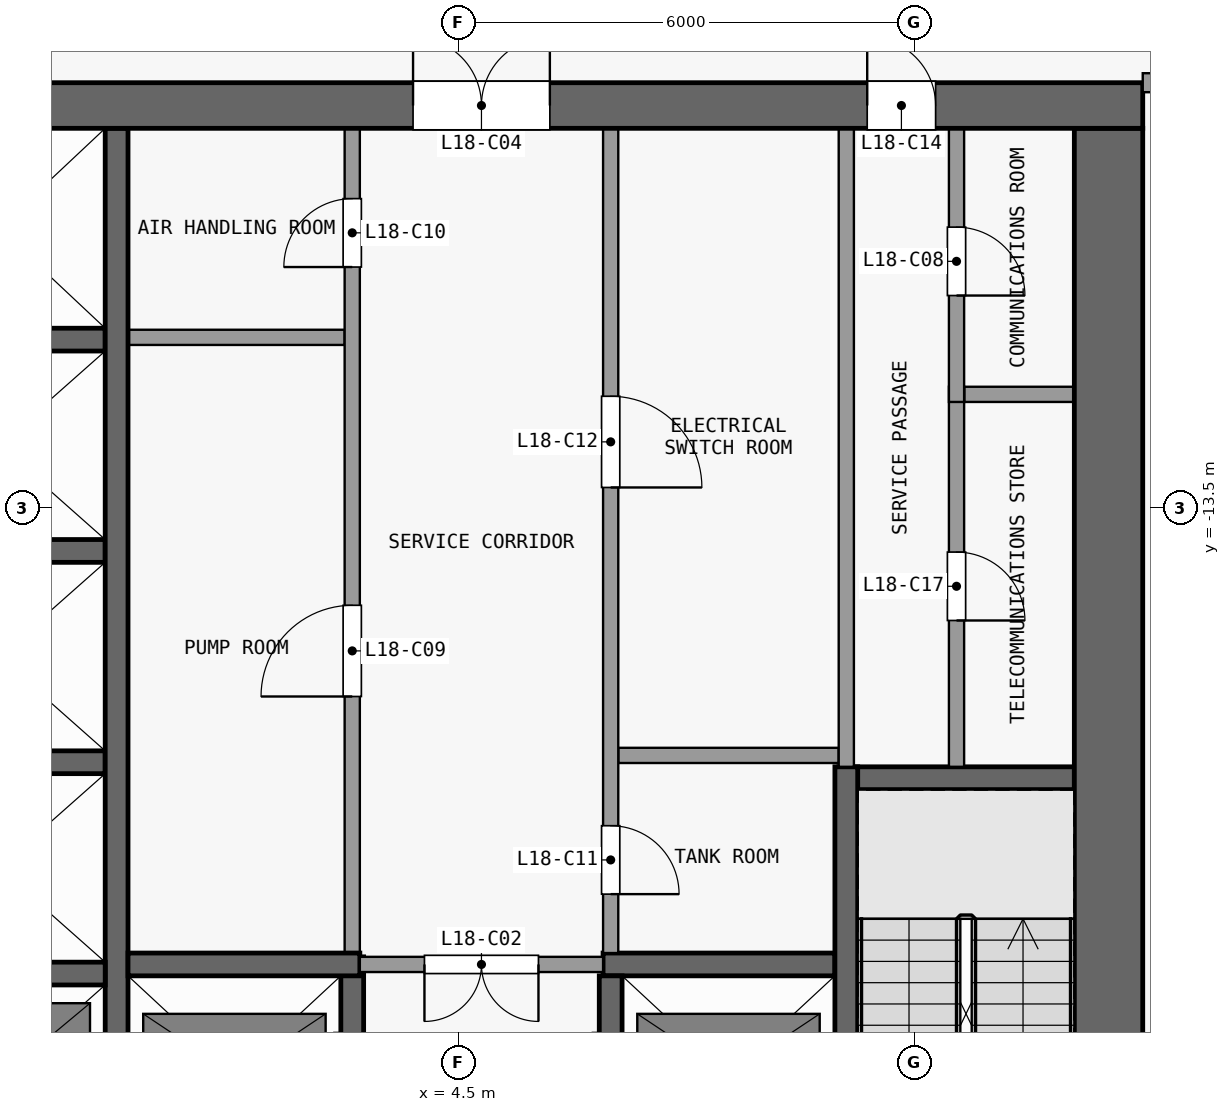
"""IFC4 building model, lengths in metres.
Left out: names, types, materials, properties, quantities, classifications, styles, units other than length and angle.
Written with IfcOpenShell. Run it as: python <this file> out.ifc"""

import sys

from ifc_helpers import new_model, si_unit, direction, frame, frame_2d, origin, place, context, subcontext, project, spatial, rectangle, extrude, element, fill, save


model = new_model("IFC4")
c1 = context("Model", 3, precision=1e-05, world=origin(), true_north=direction((0.0, 1.0)))
c2 = subcontext(c1, "Body", "Model", "MODEL_VIEW")
j1 = project(units=[si_unit("LENGTHUNIT", "METRE"), si_unit("PLANEANGLEUNIT", "RADIAN")], contexts=[c1])
p1 = place(None, origin())
s1 = spatial("IfcSite", under=j1, at=p1, CompositionType="ELEMENT")
p2 = place(p1, origin())
s2 = spatial("IfcBuilding", under=s1, at=p2, CompositionType="ELEMENT")
p3 = place(p2, frame((0.0, 0.0, 75.7)))
s3 = spatial("IfcBuildingStorey", under=s2, at=p3, CompositionType="ELEMENT", Elevation=75.7)
p4 = place(p3, frame((-13.5, -8.2, 0.0), z_axis=(0.0, 0.0, 1.0), x_axis=(1.0, 0.0, 0.0)))
e1 = element("IfcWall", 1, at=p4, inside=s3, PredefinedType="SHEAR", context=c2, shape_type="SweptSolid", body=[
    extrude(rectangle(XDim=27.0, YDim=0.6, at=frame_2d((13.5, 0.0))), origin(), (0.0, 0.0, 1.0), 5.0),
])
p5 = place(p4, frame((7.8, 0.0, 0.0)))
e2 = element("IfcOpeningElement", 2, at=p5, cuts=e1, PredefinedType="OPENING", context=c2, shape_type="SweptSolid", body=[
    extrude(rectangle(XDim=1.8, YDim=2.1, at=frame_2d((0.9, 1.05))), frame((0.0, 0.31, 0.0), z_axis=(0.0, -1.0, 0.0), x_axis=(1.0, 0.0, 0.0)), (0.0, 0.0, 1.0), 0.62),
])
p6 = place(p4, frame((17.4, 0.0, 0.0)))
e3 = element("IfcOpeningElement", 3, at=p6, cuts=e1, PredefinedType="OPENING", context=c2, shape_type="SweptSolid", body=[
    extrude(rectangle(XDim=1.8, YDim=2.1, at=frame_2d((0.9, 1.05))), frame((0.0, 0.31, 0.0), z_axis=(0.0, -1.0, 0.0), x_axis=(1.0, 0.0, 0.0)), (0.0, 0.0, 1.0), 0.62),
])
p7 = place(p4, frame((2.725, 0.0, 0.0)))
e4 = element("IfcOpeningElement", 4, at=p7, cuts=e1, PredefinedType="OPENING", context=c2, shape_type="SweptSolid", body=[
    extrude(rectangle(XDim=0.9, YDim=2.1, at=frame_2d((0.45, 1.05))), frame((0.0, 0.31, 0.0), z_axis=(0.0, -1.0, 0.0), x_axis=(1.0, 0.0, 0.0)), (0.0, 0.0, 1.0), 0.62),
])
p8 = place(p4, frame((23.375, 0.0, 0.0)))
e5 = element("IfcOpeningElement", 5, at=p8, cuts=e1, PredefinedType="OPENING", context=c2, shape_type="SweptSolid", body=[
    extrude(rectangle(XDim=0.9, YDim=2.1, at=frame_2d((0.45, 1.05))), frame((0.0, 0.31, 0.0), z_axis=(0.0, -1.0, 0.0), x_axis=(1.0, 0.0, 0.0)), (0.0, 0.0, 1.0), 0.62),
])
p9 = place(p3, frame((13.05, -24.6, 0.0), z_axis=(0.0, 0.0, 1.0), x_axis=(0.0, 1.0, 0.0)))
e6 = element("IfcWall", 6, at=p9, inside=s3, PredefinedType="SHEAR", context=c2, shape_type="SweptSolid", body=[
    extrude(rectangle(XDim=16.1, YDim=0.9, at=frame_2d((8.05, 0.0))), origin(), (0.0, 0.0, 1.0), 5.0),
])
p10 = place(p3, frame((-2.95, -19.62, 0.0), z_axis=(0.0, 0.0, 1.0), x_axis=(1.0, 0.0, 0.0)))
e7 = element("IfcWall", 7, at=p10, inside=s3, PredefinedType="SHEAR", context=c2, shape_type="SweptSolid", body=[
    extrude(rectangle(XDim=2.8, YDim=0.3, at=frame_2d((1.4, 0.0))), origin(), (0.0, 0.0, 1.0), 5.0),
])
p11 = place(p3, frame((0.15, -19.5, 0.0), z_axis=(0.0, 0.0, 1.0), x_axis=(1.0, 0.0, 0.0)))
e8 = element("IfcWall", 8, at=p11, inside=s3, PredefinedType="SHEAR", context=c2, shape_type="SweptSolid", body=[
    extrude(rectangle(XDim=3.05, YDim=0.3, at=frame_2d((1.525, 0.0))), origin(), (0.0, 0.0, 1.0), 5.0),
])
p12 = place(p3, frame((6.4, -19.5, 0.0), z_axis=(0.0, 0.0, 1.0), x_axis=(-1.0, 0.0, 0.0)))
e9 = element("IfcWall", 9, at=p12, inside=s3, PredefinedType="PARTITIONING", context=c2, shape_type="SweptSolid", body=[
    extrude(rectangle(XDim=3.2, YDim=0.2, at=frame_2d((1.6, 0.0))), origin(), (0.0, 0.0, 1.0), 5.0),
])
p13 = place(p12, frame((0.85, 0.0, 0.0)))
e10 = element("IfcOpeningElement", 10, at=p13, cuts=e9, PredefinedType="OPENING", context=c2, shape_type="SweptSolid", body=[
    extrude(rectangle(XDim=1.5, YDim=2.1, at=frame_2d((0.75, 1.05))), frame((0.0, 0.11, 0.0), z_axis=(0.0, -1.0, 0.0), x_axis=(1.0, 0.0, 0.0)), (0.0, 0.0, 1.0), 0.22),
])
p14 = place(p3, frame((6.4, -19.5, 0.0), z_axis=(0.0, 0.0, 1.0), x_axis=(1.0, 0.0, 0.0)))
e11 = element("IfcWall", 11, at=p14, inside=s3, PredefinedType="SHEAR", context=c2, shape_type="SweptSolid", body=[
    extrude(rectangle(XDim=3.05, YDim=0.3, at=frame_2d((1.525, 0.0))), origin(), (0.0, 0.0, 1.0), 5.0),
])
p15 = place(p3, frame((9.5, -17.05, 0.0), z_axis=(0.0, 0.0, 1.0), x_axis=(1.0, 0.0, 0.0)))
e12 = element("IfcWall", 12, at=p15, inside=s3, PredefinedType="SHEAR", context=c2, shape_type="SweptSolid", body=[
    extrude(rectangle(XDim=3.1, YDim=0.3, at=frame_2d((1.55, 0.0))), origin(), (0.0, 0.0, 1.0), 5.0),
])
p16 = place(p3, frame((-2.95, -16.84, 0.0), z_axis=(0.0, 0.0, 1.0), x_axis=(1.0, 0.0, 0.0)))
e13 = element("IfcWall", 13, at=p16, inside=s3, PredefinedType="SHEAR", context=c2, shape_type="SweptSolid", body=[
    extrude(rectangle(XDim=2.8, YDim=0.3, at=frame_2d((1.4, 0.0))), origin(), (0.0, 0.0, 1.0), 5.0),
])
p17 = place(p3, frame((6.6, -16.75, 0.0), z_axis=(0.0, 0.0, 1.0), x_axis=(1.0, 0.0, 0.0)))
e14 = element("IfcWall", 14, at=p17, inside=s3, PredefinedType="PARTITIONING", context=c2, shape_type="SweptSolid", body=[
    extrude(rectangle(XDim=2.9, YDim=0.2, at=frame_2d((1.45, 0.0))), origin(), (0.0, 0.0, 1.0), 5.0),
])
p18 = place(p3, frame((-2.95, -14.06, 0.0), z_axis=(0.0, 0.0, 1.0), x_axis=(1.0, 0.0, 0.0)))
e15 = element("IfcWall", 15, at=p18, inside=s3, PredefinedType="SHEAR", context=c2, shape_type="SweptSolid", body=[
    extrude(rectangle(XDim=2.8, YDim=0.3, at=frame_2d((1.4, 0.0))), origin(), (0.0, 0.0, 1.0), 5.0),
])
p19 = place(p3, frame((11.15, -12.0, 0.0), z_axis=(0.0, 0.0, 1.0), x_axis=(1.0, 0.0, 0.0)))
e16 = element("IfcWall", 16, at=p19, inside=s3, PredefinedType="PARTITIONING", context=c2, shape_type="SweptSolid", body=[
    extrude(rectangle(XDim=1.45, YDim=0.2, at=frame_2d((0.725, 0.0))), origin(), (0.0, 0.0, 1.0), 5.0),
])
p20 = place(p3, frame((-2.95, -11.28, 0.0), z_axis=(0.0, 0.0, 1.0), x_axis=(1.0, 0.0, 0.0)))
e17 = element("IfcWall", 17, at=p20, inside=s3, PredefinedType="SHEAR", context=c2, shape_type="SweptSolid", body=[
    extrude(rectangle(XDim=2.8, YDim=0.3, at=frame_2d((1.4, 0.0))), origin(), (0.0, 0.0, 1.0), 5.0),
])
p21 = place(p3, frame((0.15, -11.25, 0.0), z_axis=(0.0, 0.0, 1.0), x_axis=(1.0, 0.0, 0.0)))
e18 = element("IfcWall", 18, at=p21, inside=s3, PredefinedType="PARTITIONING", context=c2, shape_type="SweptSolid", body=[
    extrude(rectangle(XDim=2.85, YDim=0.2, at=frame_2d((1.425, 0.0))), origin(), (0.0, 0.0, 1.0), 5.0),
])
p22 = place(p3, frame((0.0, -22.25, 0.0), z_axis=(0.0, 0.0, 1.0), x_axis=(0.0, 1.0, 0.0)))
e19 = element("IfcWall", 19, at=p22, inside=s3, PredefinedType="SHEAR", context=c2, shape_type="SweptSolid", body=[
    extrude(rectangle(XDim=13.75, YDim=0.3, at=frame_2d((6.875, 0.0))), origin(), (0.0, 0.0, 1.0), 5.0),
])
p23 = place(p3, frame((3.1, -22.25, 0.0), z_axis=(0.0, 0.0, 1.0), x_axis=(0.0, 1.0, 0.0)))
e20 = element("IfcWall", 20, at=p23, inside=s3, PredefinedType="SHEAR", context=c2, shape_type="SweptSolid", body=[
    extrude(rectangle(XDim=2.85, YDim=0.3, at=frame_2d((1.425, 0.0))), origin(), (0.0, 0.0, 1.0), 5.0),
])
p24 = place(p23, frame((0.75, 0.0, 0.0)))
e21 = element("IfcOpeningElement", 21, at=p24, cuts=e20, PredefinedType="OPENING", context=c2, shape_type="SweptSolid", body=[
    extrude(rectangle(XDim=1.1, YDim=2.1, at=frame_2d((0.55, 1.05))), frame((0.0, 0.16, 0.0), z_axis=(0.0, -1.0, 0.0), x_axis=(1.0, 0.0, 0.0)), (0.0, 0.0, 1.0), 0.32),
])
p25 = place(p3, frame((3.1, -19.6, 0.0), z_axis=(0.0, 0.0, 1.0), x_axis=(0.0, 1.0, 0.0)))
e22 = element("IfcWall", 22, at=p25, inside=s3, PredefinedType="PARTITIONING", context=c2, shape_type="SweptSolid", body=[
    extrude(rectangle(XDim=11.1, YDim=0.2, at=frame_2d((5.55, 0.0))), origin(), (0.0, 0.0, 1.0), 5.0),
])
p26 = place(p25, frame((3.625, 0.0, 0.0)))
e23 = element("IfcOpeningElement", 23, at=p26, cuts=e22, PredefinedType="OPENING", context=c2, shape_type="SweptSolid", body=[
    extrude(rectangle(XDim=1.2, YDim=2.1, at=frame_2d((0.6, 1.05))), frame((0.0, 0.11, 0.0), z_axis=(0.0, -1.0, 0.0), x_axis=(1.0, 0.0, 0.0)), (0.0, 0.0, 1.0), 0.22),
])
p27 = place(p25, frame((9.275, 0.0, 0.0)))
e24 = element("IfcOpeningElement", 24, at=p27, cuts=e22, PredefinedType="OPENING", context=c2, shape_type="SweptSolid", body=[
    extrude(rectangle(XDim=0.9, YDim=2.1, at=frame_2d((0.45, 1.05))), frame((0.0, 0.11, 0.0), z_axis=(0.0, -1.0, 0.0), x_axis=(1.0, 0.0, 0.0)), (0.0, 0.0, 1.0), 0.22),
])
p28 = place(p3, frame((6.5, -22.25, 0.0), z_axis=(0.0, 0.0, 1.0), x_axis=(0.0, 1.0, 0.0)))
e25 = element("IfcWall", 25, at=p28, inside=s3, PredefinedType="SHEAR", context=c2, shape_type="SweptSolid", body=[
    extrude(rectangle(XDim=2.6, YDim=0.3, at=frame_2d((1.3, 0.0))), origin(), (0.0, 0.0, 1.0), 5.0),
])
p29 = place(p28, frame((0.75, 0.0, 0.0)))
e26 = element("IfcOpeningElement", 26, at=p29, cuts=e25, PredefinedType="OPENING", context=c2, shape_type="SweptSolid", body=[
    extrude(rectangle(XDim=1.1, YDim=2.1, at=frame_2d((0.55, 1.05))), frame((0.0, 0.16, 0.0), z_axis=(0.0, -1.0, 0.0), x_axis=(1.0, 0.0, 0.0)), (0.0, 0.0, 1.0), 0.32),
])
p30 = place(p3, frame((6.5, -8.5, 0.0), z_axis=(0.0, 0.0, 1.0), x_axis=(0.0, -1.0, 0.0)))
e27 = element("IfcWall", 27, at=p30, inside=s3, PredefinedType="PARTITIONING", context=c2, shape_type="SweptSolid", body=[
    extrude(rectangle(XDim=10.85, YDim=0.2, at=frame_2d((5.425, 0.0))), origin(), (0.0, 0.0, 1.0), 5.0),
])
p31 = place(p30, frame((9.175, 0.0, 0.0)))
e28 = element("IfcOpeningElement", 28, at=p31, cuts=e27, PredefinedType="OPENING", context=c2, shape_type="SweptSolid", body=[
    extrude(rectangle(XDim=0.9, YDim=2.1, at=frame_2d((0.45, 1.05))), frame((0.0, 0.11, 0.0), z_axis=(0.0, -1.0, 0.0), x_axis=(1.0, 0.0, 0.0)), (0.0, 0.0, 1.0), 0.22),
])
p32 = place(p30, frame((3.525, 0.0, 0.0)))
e29 = element("IfcOpeningElement", 29, at=p32, cuts=e27, PredefinedType="OPENING", context=c2, shape_type="SweptSolid", body=[
    extrude(rectangle(XDim=1.2, YDim=2.1, at=frame_2d((0.6, 1.05))), frame((0.0, 0.11, 0.0), z_axis=(0.0, -1.0, 0.0), x_axis=(1.0, 0.0, 0.0)), (0.0, 0.0, 1.0), 0.22),
])
p33 = place(p3, frame((9.6, -16.9, 0.0), z_axis=(0.0, 0.0, 1.0), x_axis=(0.0, -1.0, 0.0)))
e30 = element("IfcWall", 30, at=p33, inside=s3, PredefinedType="SHEAR", context=c2, shape_type="SweptSolid", body=[
    extrude(rectangle(XDim=7.7, YDim=0.3, at=frame_2d((3.85, 0.0))), origin(), (0.0, 0.0, 1.0), 5.0),
])
p34 = place(p33, frame((6.5, 0.0, 0.0)))
e31 = element("IfcOpeningElement", 31, at=p34, cuts=e30, PredefinedType="OPENING", context=c2, shape_type="SweptSolid", body=[
    extrude(rectangle(XDim=1.1, YDim=2.1, at=frame_2d((0.55, 1.05))), frame((0.0, 0.16, 0.0), z_axis=(0.0, -1.0, 0.0), x_axis=(1.0, 0.0, 0.0)), (0.0, 0.0, 1.0), 0.32),
])
p35 = place(p3, frame((9.6, -16.9, 0.0), z_axis=(0.0, 0.0, 1.0), x_axis=(0.0, 1.0, 0.0)))
e32 = element("IfcWall", 32, at=p35, inside=s3, PredefinedType="PARTITIONING", context=c2, shape_type="SweptSolid", body=[
    extrude(rectangle(XDim=8.4, YDim=0.2, at=frame_2d((4.2, 0.0))), origin(), (0.0, 0.0, 1.0), 5.0),
])
p36 = place(p3, frame((11.05, -11.9, 0.0), z_axis=(0.0, 0.0, 1.0), x_axis=(0.0, -1.0, 0.0)))
e33 = element("IfcWall", 33, at=p36, inside=s3, PredefinedType="PARTITIONING", context=c2, shape_type="SweptSolid", body=[
    extrude(rectangle(XDim=5.0, YDim=0.2, at=frame_2d((2.5, 0.0))), origin(), (0.0, 0.0, 1.0), 5.0),
])
p37 = place(p36, frame((2.175, 0.0, 0.0)))
e34 = element("IfcOpeningElement", 34, at=p37, cuts=e33, PredefinedType="OPENING", context=c2, shape_type="SweptSolid", body=[
    extrude(rectangle(XDim=0.9, YDim=2.1, at=frame_2d((0.45, 1.05))), frame((0.0, 0.11, 0.0), z_axis=(0.0, -1.0, 0.0), x_axis=(1.0, 0.0, 0.0)), (0.0, 0.0, 1.0), 0.22),
])
p38 = place(p3, frame((11.05, -8.5, 0.0), z_axis=(0.0, 0.0, 1.0), x_axis=(0.0, -1.0, 0.0)))
e35 = element("IfcWall", 35, at=p38, inside=s3, PredefinedType="PARTITIONING", context=c2, shape_type="SweptSolid", body=[
    extrude(rectangle(XDim=3.6, YDim=0.2, at=frame_2d((1.8, 0.0))), origin(), (0.0, 0.0, 1.0), 5.0),
])
p39 = place(p38, frame((1.3, 0.0, 0.0)))
e36 = element("IfcOpeningElement", 36, at=p39, cuts=e35, PredefinedType="OPENING", context=c2, shape_type="SweptSolid", body=[
    extrude(rectangle(XDim=0.9, YDim=2.1, at=frame_2d((0.45, 1.05))), frame((0.0, 0.11, 0.0), z_axis=(0.0, -1.0, 0.0), x_axis=(1.0, 0.0, 0.0)), (0.0, 0.0, 1.0), 0.22),
])
p40 = place(p3, frame((13.5, -7.9, 0.0), z_axis=(0.0, 0.0, 1.0), x_axis=(1.0, 0.0, 0.0)))
e37 = element("IfcWall", 37, at=p40, inside=s3, PredefinedType="PARTITIONING", context=c2, shape_type="SweptSolid", body=[
    extrude(rectangle(XDim=11.85, YDim=0.25, at=frame_2d((5.925, 0.0))), origin(), (0.0, 0.0, 1.0), 5.0),
])
p41 = place(p40, frame((5.3, 0.0, 0.0)))
e38 = element("IfcOpeningElement", 38, at=p41, cuts=e37, PredefinedType="OPENING", context=c2, shape_type="SweptSolid", body=[
    extrude(rectangle(XDim=1.2, YDim=2.1, at=frame_2d((0.6, 1.05))), frame((0.0, 0.135, 0.0), z_axis=(0.0, -1.0, 0.0), x_axis=(1.0, 0.0, 0.0)), (0.0, 0.0, 1.0), 0.27),
])
p42 = place(p13, origin())
e39 = element("IfcDoor", 39, at=p42, inside=s3, OperationType="DOUBLE_DOOR_SINGLE_SWING", PredefinedType="DOOR", context=c2, shape_type="SweptSolid", body=[
    extrude(rectangle(XDim=1.5, YDim=2.1, at=frame_2d((0.75, 1.05))), frame((0.0, 0.025, 0.0), z_axis=(0.0, -1.0, 0.0), x_axis=(1.0, 0.0, 0.0)), (0.0, 0.0, 1.0), 0.05),
])
fill(e10, e39)
p43 = place(p6, origin())
e40 = element("IfcDoor", 40, at=p43, inside=s3, OperationType="DOUBLE_DOOR_SINGLE_SWING", PredefinedType="DOOR", context=c2, shape_type="SweptSolid", body=[
    extrude(rectangle(XDim=1.8, YDim=2.1, at=frame_2d((0.9, 1.05))), frame((0.0, 0.025, 0.0), z_axis=(0.0, -1.0, 0.0), x_axis=(1.0, 0.0, 0.0)), (0.0, 0.0, 1.0), 0.05),
])
fill(e3, e40)
p44 = place(p39, origin())
e41 = element("IfcDoor", 41, at=p44, inside=s3, OperationType="SINGLE_SWING_RIGHT", PredefinedType="DOOR", context=c2, shape_type="SweptSolid", body=[
    extrude(rectangle(XDim=0.9, YDim=2.1, at=frame_2d((0.45, 1.05))), frame((0.0, 0.025, 0.0), z_axis=(0.0, -1.0, 0.0), x_axis=(1.0, 0.0, 0.0)), (0.0, 0.0, 1.0), 0.05),
])
fill(e36, e41)
p45 = place(p26, origin())
e42 = element("IfcDoor", 42, at=p45, inside=s3, OperationType="SINGLE_SWING_LEFT", PredefinedType="DOOR", context=c2, shape_type="SweptSolid", body=[
    extrude(rectangle(XDim=1.2, YDim=2.1, at=frame_2d((0.6, 1.05))), frame((0.0, 0.025, 0.0), z_axis=(0.0, -1.0, 0.0), x_axis=(1.0, 0.0, 0.0)), (0.0, 0.0, 1.0), 0.05),
])
fill(e23, e42)
p46 = place(p27, origin())
e43 = element("IfcDoor", 43, at=p46, inside=s3, OperationType="SINGLE_SWING_LEFT", PredefinedType="DOOR", context=c2, shape_type="SweptSolid", body=[
    extrude(rectangle(XDim=0.9, YDim=2.1, at=frame_2d((0.45, 1.05))), frame((0.0, 0.025, 0.0), z_axis=(0.0, -1.0, 0.0), x_axis=(1.0, 0.0, 0.0)), (0.0, 0.0, 1.0), 0.05),
])
fill(e24, e43)
p47 = place(p31, origin())
e44 = element("IfcDoor", 44, at=p47, inside=s3, OperationType="SINGLE_SWING_RIGHT", PredefinedType="DOOR", context=c2, shape_type="SweptSolid", body=[
    extrude(rectangle(XDim=0.9, YDim=2.1, at=frame_2d((0.45, 1.05))), frame((0.0, 0.025, 0.0), z_axis=(0.0, -1.0, 0.0), x_axis=(1.0, 0.0, 0.0)), (0.0, 0.0, 1.0), 0.05),
])
fill(e28, e44)
p48 = place(p32, origin())
e45 = element("IfcDoor", 45, at=p48, inside=s3, OperationType="SINGLE_SWING_RIGHT", PredefinedType="DOOR", context=c2, shape_type="SweptSolid", body=[
    extrude(rectangle(XDim=1.2, YDim=2.1, at=frame_2d((0.6, 1.05))), frame((0.0, 0.025, 0.0), z_axis=(0.0, -1.0, 0.0), x_axis=(1.0, 0.0, 0.0)), (0.0, 0.0, 1.0), 0.05),
])
fill(e29, e45)
p49 = place(p8, origin())
e46 = element("IfcDoor", 46, at=p49, inside=s3, OperationType="SINGLE_SWING_LEFT", PredefinedType="DOOR", context=c2, shape_type="SweptSolid", body=[
    extrude(rectangle(XDim=0.9, YDim=2.1, at=frame_2d((0.45, 1.05))), frame((0.0, 0.025, 0.0), z_axis=(0.0, -1.0, 0.0), x_axis=(1.0, 0.0, 0.0)), (0.0, 0.0, 1.0), 0.05),
])
fill(e5, e46)
p50 = place(p37, origin())
e47 = element("IfcDoor", 47, at=p50, inside=s3, OperationType="SINGLE_SWING_RIGHT", PredefinedType="DOOR", context=c2, shape_type="SweptSolid", body=[
    extrude(rectangle(XDim=0.9, YDim=2.1, at=frame_2d((0.45, 1.05))), frame((0.0, 0.025, 0.0), z_axis=(0.0, -1.0, 0.0), x_axis=(1.0, 0.0, 0.0)), (0.0, 0.0, 1.0), 0.05),
])
fill(e34, e47)
save(model, sys.argv[1])
